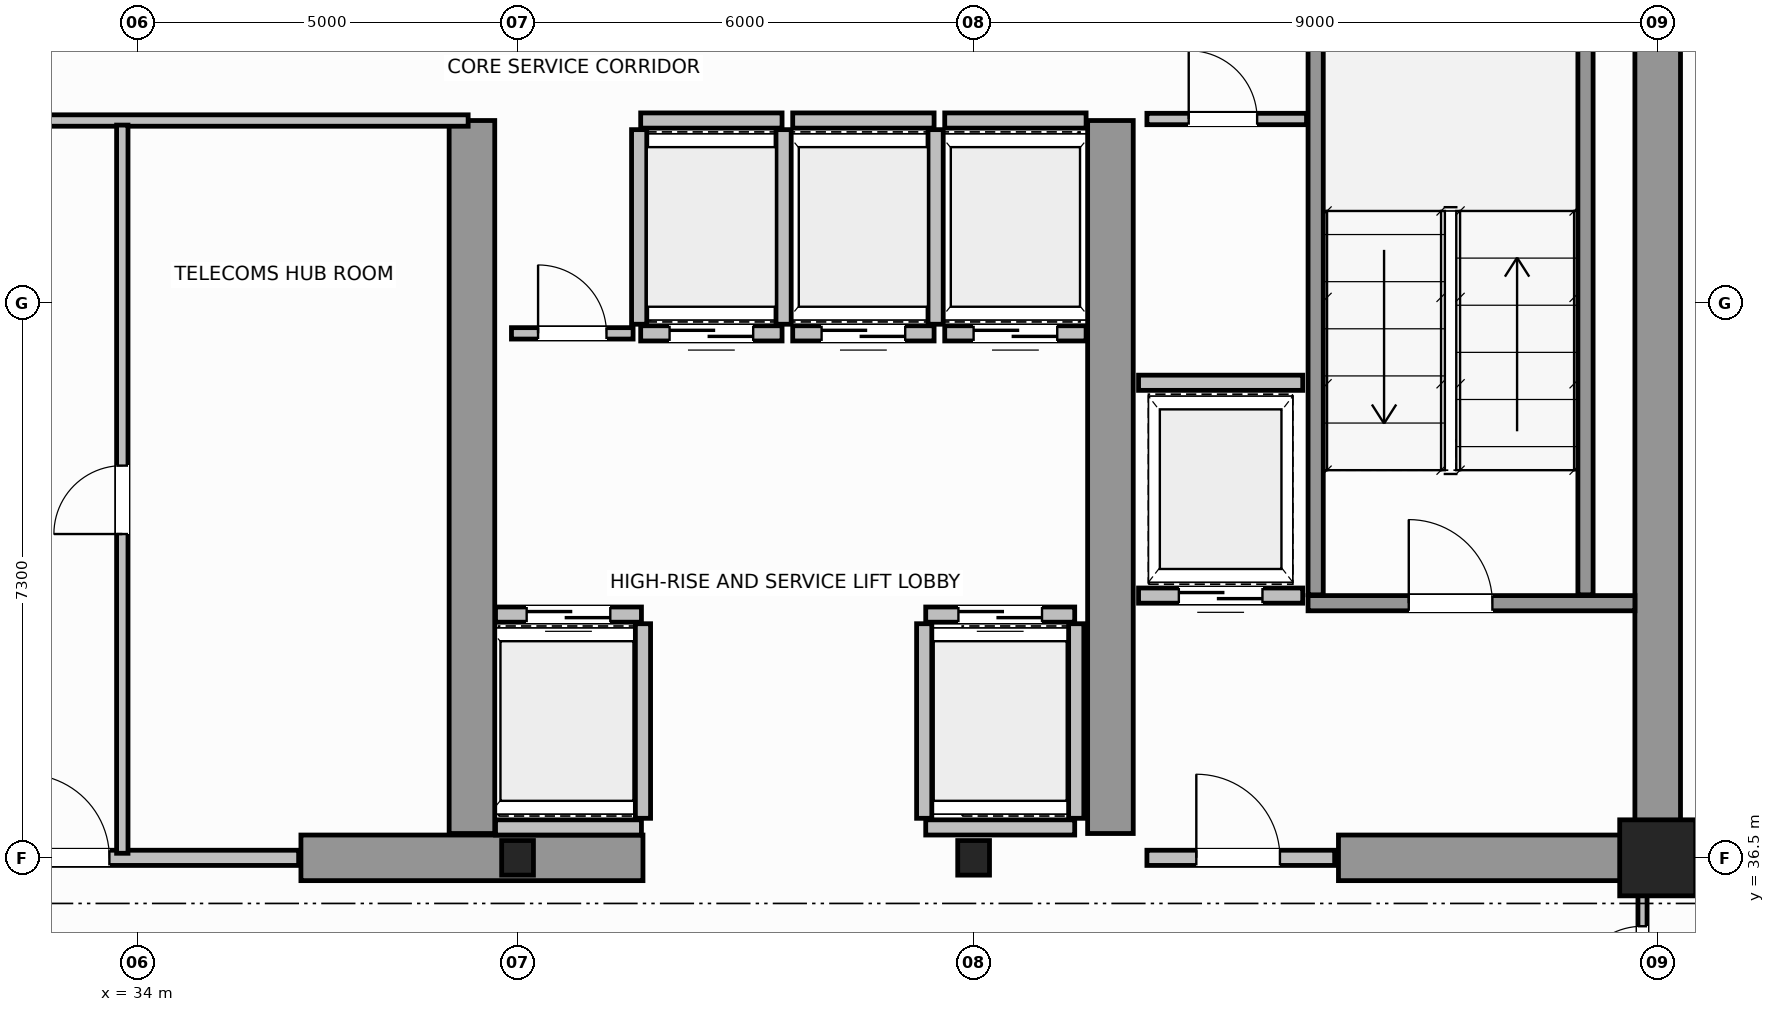
"""IFC4 building model, lengths in metres.
Left out: names, types, materials, properties, quantities, classifications, styles, units other than length and angle.
Written with IfcOpenShell. Run it as: python <this file> out.ifc"""

import sys

from ifc_helpers import new_model, si_unit, direction, frame, frame_2d, origin, origin_2d, place, context, subcontext, project, spatial, rectangle, i_section, extrude, source, transform, mapped, element, fill, save


model = new_model("IFC4")
c1 = context("Model", 3, precision=1e-05, world=origin(), true_north=direction((0.0, 1.0)))
c2 = subcontext(c1, "Body", "Model", "MODEL_VIEW")
j1 = project(units=[si_unit("LENGTHUNIT", "METRE"), si_unit("PLANEANGLEUNIT", "RADIAN")], contexts=[c1])
p1 = place(None, origin())
s1 = spatial("IfcSite", under=j1, at=p1, CompositionType="ELEMENT")
p2 = place(p1, origin())
s2 = spatial("IfcBuilding", under=s1, at=p2, CompositionType="ELEMENT")
p3 = place(p2, frame((0.0, 0.0, 223.2)))
s3 = spatial("IfcBuildingStorey", under=s2, at=p3, CompositionType="ELEMENT", Elevation=223.2)
m1 = source(origin(), c2, "Body", "SweptSolid", [
    extrude(i_section(OverallWidth=0.418, OverallDepth=0.455, WebThickness=0.042, FlangeThickness=0.058, FilletRadius=0.015, at=origin_2d()), origin(), (0.0, 0.0, 1.0), 3.8),
])
for number, where, z_axis, x_axis in (
    (1, (39.0, 36.5, 0.0), (0.0, 0.0, 1.0), (1.0, 0.0, 0.0)),
    (2, (45.0, 36.5, 0.0), (0.0, 0.0, 1.0), (1.0, 0.0, 0.0)),
):
    element("IfcColumn", number, at=place(p3, frame(where, z_axis=z_axis, x_axis=x_axis)), inside=s3, PredefinedType="COLUMN", context=c2, shape_type="MappedRepresentation", body=[
        mapped(m1, transform((0.0, 0.0, 0.0), scale=1.0)),
    ])
m2 = source(origin(), c2, "Body", "SweptSolid", [
    extrude(rectangle(XDim=1.0, YDim=1.0, at=origin_2d()), origin(), (0.0, 0.0, 1.0), 3.8),
])
p4 = place(p3, frame((54.0, 36.5, 0.0), z_axis=(0.0, 0.0, 1.0), x_axis=(1.0, 0.0, 0.0)))
e3 = element("IfcColumn", 3, at=p4, inside=s3, PredefinedType="COLUMN", context=c2, shape_type="MappedRepresentation", body=[
    mapped(m2, transform((0.0, 0.0, 0.0), scale=1.0)),
])
p5 = place(p3, frame((54.0, 36.5, 0.0), z_axis=(0.0, 0.0, 1.0), x_axis=(0.0, 1.0, 0.0)))
e4 = element("IfcWall", 4, at=p5, inside=s3, PredefinedType="SHEAR", context=c2, shape_type="SweptSolid", body=[
    extrude(rectangle(XDim=14.5, YDim=0.6, at=frame_2d((7.25, 0.0))), origin(), (0.0, 0.0, 1.0), 3.8),
])
p6 = place(p3, frame((36.15, 36.5, 0.0), z_axis=(0.0, 0.0, 1.0), x_axis=(1.0, 0.0, 0.0)))
e5 = element("IfcWall", 5, at=p6, inside=s3, PredefinedType="SHEAR", context=c2, shape_type="SweptSolid", body=[
    extrude(rectangle(XDim=4.5, YDim=0.6, at=frame_2d((2.25, 0.0))), origin(), (0.0, 0.0, 1.0), 3.8),
])
p7 = place(p3, frame((49.8, 36.5, 0.0), z_axis=(0.0, 0.0, 1.0), x_axis=(1.0, 0.0, 0.0)))
e6 = element("IfcWall", 6, at=p7, inside=s3, PredefinedType="SHEAR", context=c2, shape_type="SweptSolid", body=[
    extrude(rectangle(XDim=3.88, YDim=0.6, at=frame_2d((1.94, 0.0))), origin(), (0.0, 0.0, 1.0), 2.58),
])
for number, where, z_axis, x_axis in (
    (7, (38.4, 36.82, 0.0), (0.0, 0.0, 1.0), (0.0, 1.0, 0.0)),
    (8, (46.8, 36.82, 0.0), (0.0, 0.0, 1.0), (0.0, 1.0, 0.0)),
):
    element("IfcWall", number, at=place(p3, frame(where, z_axis=z_axis, x_axis=x_axis)), inside=s3, PredefinedType="SHEAR", context=c2, shape_type="SweptSolid", body=[
        extrude(rectangle(XDim=9.38, YDim=0.6, at=frame_2d((4.69, 0.0))), origin(), (0.0, 0.0, 1.0), 3.8),
    ])
p8 = place(p3, frame((49.4, 39.85, 0.0), z_axis=(0.0, 0.0, 1.0), x_axis=(1.0, 0.0, 0.0)))
e9 = element("IfcWall", 9, at=p8, inside=s3, PredefinedType="SOLIDWALL", context=c2, shape_type="SweptSolid", body=[
    extrude(rectangle(XDim=4.3, YDim=0.2, at=frame_2d((2.15, 0.0))), origin(), (0.0, 0.0, 1.0), 3.8),
])
p9 = place(p8, frame((1.325, 0.0, 0.0)))
e10 = element("IfcOpeningElement", 10, at=p9, cuts=e9, PredefinedType="OPENING", context=c2, shape_type="SweptSolid", body=[
    extrude(rectangle(XDim=1.1, YDim=2.15, at=frame_2d((0.55, 1.075))), frame((0.0, 0.11, 0.0), z_axis=(0.0, -1.0, 0.0), x_axis=(1.0, 0.0, 0.0)), (0.0, 0.0, 1.0), 0.22),
])
for number, where, z_axis, x_axis in (
    (11, (49.5, 39.96, 0.0), (0.0, 0.0, 1.0), (0.0, 1.0, 0.0)),
    (12, (53.05, 39.96, 0.0), (0.0, 0.0, 1.0), (0.0, 1.0, 0.0)),
):
    element("IfcWall", number, at=place(p3, frame(where, z_axis=z_axis, x_axis=x_axis)), inside=s3, PredefinedType="SOLIDWALL", context=c2, shape_type="SweptSolid", body=[
        extrude(rectangle(XDim=9.93, YDim=0.2, at=frame_2d((4.965, 0.0))), origin(), (0.0, 0.0, 1.0), 3.8),
    ])
p10 = place(p3, frame((47.28, 36.5, 0.0), z_axis=(0.0, 0.0, 1.0), x_axis=(1.0, 0.0, 0.0)))
e13 = element("IfcWall", 13, at=p10, inside=s3, PredefinedType="SOLIDWALL", context=c2, shape_type="SweptSolid", body=[
    extrude(rectangle(XDim=2.47, YDim=0.2, at=frame_2d((1.235, 0.0))), origin(), (0.0, 0.0, 1.0), 2.57),
])
p11 = place(p10, frame((0.65, 0.0, 0.0)))
e14 = element("IfcOpeningElement", 14, at=p11, cuts=e13, PredefinedType="OPENING", context=c2, shape_type="SweptSolid", body=[
    extrude(rectangle(XDim=1.1, YDim=2.15, at=frame_2d((0.55, 1.075))), frame((0.0, 0.11, 0.0), z_axis=(0.0, -1.0, 0.0), x_axis=(1.0, 0.0, 0.0)), (0.0, 0.0, 1.0), 0.22),
])
p12 = place(p3, frame((38.71, 39.7, 0.0), z_axis=(0.0, 0.0, 1.0), x_axis=(1.0, 0.0, 0.0)))
e15 = element("IfcWall", 15, at=p12, inside=s3, PredefinedType="SOLIDWALL", context=c2, shape_type="SweptSolid", body=[
    extrude(rectangle(XDim=1.92, YDim=0.2, at=frame_2d((0.96, 0.0))), origin(), (0.0, 0.0, 1.0), 3.58),
])
p13 = place(p12, frame((0.41, 0.0, 0.0)))
e16 = element("IfcOpeningElement", 16, at=p13, cuts=e15, PredefinedType="OPENING", context=c2, shape_type="SweptSolid", body=[
    extrude(rectangle(XDim=1.1, YDim=2.15, at=frame_2d((0.55, 1.075))), frame((0.0, 0.11, 0.0), z_axis=(0.0, -1.0, 0.0), x_axis=(1.0, 0.0, 0.0)), (0.0, 0.0, 1.0), 0.22),
])
p14 = place(p3, frame((38.71, 36.9, 0.0), z_axis=(0.0, 0.0, 1.0), x_axis=(1.0, 0.0, 0.0)))
e17 = element("IfcWall", 17, at=p14, inside=s3, PredefinedType="SOLIDWALL", context=c2, shape_type="SweptSolid", body=[
    extrude(rectangle(XDim=1.92, YDim=0.2, at=frame_2d((0.96, 0.0))), origin(), (0.0, 0.0, 1.0), 3.58),
])
p15 = place(p3, frame((40.65, 37.02, 0.0), z_axis=(0.0, 0.0, 1.0), x_axis=(0.0, 1.0, 0.0)))
e18 = element("IfcWall", 18, at=p15, inside=s3, PredefinedType="SOLIDWALL", context=c2, shape_type="SweptSolid", body=[
    extrude(rectangle(XDim=2.56, YDim=0.2, at=frame_2d((1.28, 0.0))), origin(), (0.0, 0.0, 1.0), 3.58),
])
p16 = place(p3, frame((44.37, 39.7, 0.0), z_axis=(0.0, 0.0, 1.0), x_axis=(1.0, 0.0, 0.0)))
e19 = element("IfcWall", 19, at=p16, inside=s3, PredefinedType="SOLIDWALL", context=c2, shape_type="SweptSolid", body=[
    extrude(rectangle(XDim=1.96, YDim=0.2, at=frame_2d((0.98, 0.0))), origin(), (0.0, 0.0, 1.0), 3.58),
])
p17 = place(p16, frame((0.43, 0.0, 0.0)))
e20 = element("IfcOpeningElement", 20, at=p17, cuts=e19, PredefinedType="OPENING", context=c2, shape_type="SweptSolid", body=[
    extrude(rectangle(XDim=1.1, YDim=2.15, at=frame_2d((0.55, 1.075))), frame((0.0, 0.11, 0.0), z_axis=(0.0, -1.0, 0.0), x_axis=(1.0, 0.0, 0.0)), (0.0, 0.0, 1.0), 0.22),
])
p18 = place(p3, frame((44.37, 36.9, 0.0), z_axis=(0.0, 0.0, 1.0), x_axis=(1.0, 0.0, 0.0)))
e21 = element("IfcWall", 21, at=p18, inside=s3, PredefinedType="SOLIDWALL", context=c2, shape_type="SweptSolid", body=[
    extrude(rectangle(XDim=1.96, YDim=0.2, at=frame_2d((0.98, 0.0))), origin(), (0.0, 0.0, 1.0), 2.57),
])
for number, where, z_axis, x_axis in (
    (22, (44.35, 37.02, 0.0), (0.0, 0.0, 1.0), (0.0, 1.0, 0.0)),
    (23, (46.35, 37.02, 0.0), (0.0, 0.0, 1.0), (0.0, 1.0, 0.0)),
):
    element("IfcWall", number, at=place(p3, frame(where, z_axis=z_axis, x_axis=x_axis)), inside=s3, PredefinedType="SOLIDWALL", context=c2, shape_type="SweptSolid", body=[
        extrude(rectangle(XDim=2.56, YDim=0.2, at=frame_2d((1.28, 0.0))), origin(), (0.0, 0.0, 1.0), 3.58),
    ])
p19 = place(p3, frame((40.62, 43.4, 0.0), z_axis=(0.0, 0.0, 1.0), x_axis=(1.0, 0.0, 0.0)))
e24 = element("IfcWall", 24, at=p19, inside=s3, PredefinedType="SOLIDWALL", context=c2, shape_type="SweptSolid", body=[
    extrude(rectangle(XDim=1.86, YDim=0.2, at=frame_2d((0.93, 0.0))), origin(), (0.0, 0.0, 1.0), 3.58),
])
p20 = place(p19, frame((0.38, 0.0, 0.0)))
e25 = element("IfcOpeningElement", 25, at=p20, cuts=e24, PredefinedType="OPENING", context=c2, shape_type="SweptSolid", body=[
    extrude(rectangle(XDim=1.1, YDim=2.15, at=frame_2d((0.55, 1.075))), frame((0.0, 0.11, 0.0), z_axis=(0.0, -1.0, 0.0), x_axis=(1.0, 0.0, 0.0)), (0.0, 0.0, 1.0), 0.22),
])
p21 = place(p3, frame((40.62, 46.2, 0.0), z_axis=(0.0, 0.0, 1.0), x_axis=(1.0, 0.0, 0.0)))
e26 = element("IfcWall", 26, at=p21, inside=s3, PredefinedType="SOLIDWALL", context=c2, shape_type="SweptSolid", body=[
    extrude(rectangle(XDim=1.86, YDim=0.2, at=frame_2d((0.93, 0.0))), origin(), (0.0, 0.0, 1.0), 3.58),
])
for number, where, z_axis, x_axis in (
    (27, (40.6, 43.52, 0.0), (0.0, 0.0, 1.0), (0.0, 1.0, 0.0)),
    (28, (42.5, 43.52, 0.0), (0.0, 0.0, 1.0), (0.0, 1.0, 0.0)),
):
    element("IfcWall", number, at=place(p3, frame(where, z_axis=z_axis, x_axis=x_axis)), inside=s3, PredefinedType="SOLIDWALL", context=c2, shape_type="SweptSolid", body=[
        extrude(rectangle(XDim=2.56, YDim=0.2, at=frame_2d((1.28, 0.0))), origin(), (0.0, 0.0, 1.0), 3.58),
    ])
p22 = place(p3, frame((42.62, 43.4, 0.0), z_axis=(0.0, 0.0, 1.0), x_axis=(1.0, 0.0, 0.0)))
e29 = element("IfcWall", 29, at=p22, inside=s3, PredefinedType="SOLIDWALL", context=c2, shape_type="SweptSolid", body=[
    extrude(rectangle(XDim=1.86, YDim=0.2, at=frame_2d((0.93, 0.0))), origin(), (0.0, 0.0, 1.0), 3.58),
])
p23 = place(p22, frame((0.38, 0.0, 0.0)))
e30 = element("IfcOpeningElement", 30, at=p23, cuts=e29, PredefinedType="OPENING", context=c2, shape_type="SweptSolid", body=[
    extrude(rectangle(XDim=1.1, YDim=2.15, at=frame_2d((0.55, 1.075))), frame((0.0, 0.11, 0.0), z_axis=(0.0, -1.0, 0.0), x_axis=(1.0, 0.0, 0.0)), (0.0, 0.0, 1.0), 0.22),
])
p24 = place(p3, frame((42.62, 46.2, 0.0), z_axis=(0.0, 0.0, 1.0), x_axis=(1.0, 0.0, 0.0)))
e31 = element("IfcWall", 31, at=p24, inside=s3, PredefinedType="SOLIDWALL", context=c2, shape_type="SweptSolid", body=[
    extrude(rectangle(XDim=1.86, YDim=0.2, at=frame_2d((0.93, 0.0))), origin(), (0.0, 0.0, 1.0), 3.58),
])
p25 = place(p3, frame((44.5, 43.52, 0.0), z_axis=(0.0, 0.0, 1.0), x_axis=(0.0, 1.0, 0.0)))
e32 = element("IfcWall", 32, at=p25, inside=s3, PredefinedType="SOLIDWALL", context=c2, shape_type="SweptSolid", body=[
    extrude(rectangle(XDim=2.56, YDim=0.2, at=frame_2d((1.28, 0.0))), origin(), (0.0, 0.0, 1.0), 3.58),
])
p26 = place(p3, frame((44.62, 43.4, 0.0), z_axis=(0.0, 0.0, 1.0), x_axis=(1.0, 0.0, 0.0)))
e33 = element("IfcWall", 33, at=p26, inside=s3, PredefinedType="SOLIDWALL", context=c2, shape_type="SweptSolid", body=[
    extrude(rectangle(XDim=1.86, YDim=0.2, at=frame_2d((0.93, 0.0))), origin(), (0.0, 0.0, 1.0), 3.58),
])
p27 = place(p26, frame((0.38, 0.0, 0.0)))
e34 = element("IfcOpeningElement", 34, at=p27, cuts=e33, PredefinedType="OPENING", context=c2, shape_type="SweptSolid", body=[
    extrude(rectangle(XDim=1.1, YDim=2.15, at=frame_2d((0.55, 1.075))), frame((0.0, 0.11, 0.0), z_axis=(0.0, -1.0, 0.0), x_axis=(1.0, 0.0, 0.0)), (0.0, 0.0, 1.0), 0.22),
])
p28 = place(p3, frame((44.62, 46.2, 0.0), z_axis=(0.0, 0.0, 1.0), x_axis=(1.0, 0.0, 0.0)))
e35 = element("IfcWall", 35, at=p28, inside=s3, PredefinedType="SOLIDWALL", context=c2, shape_type="SweptSolid", body=[
    extrude(rectangle(XDim=1.86, YDim=0.2, at=frame_2d((0.93, 0.0))), origin(), (0.0, 0.0, 1.0), 3.58),
])
p29 = place(p3, frame((47.17, 39.95, 0.0), z_axis=(0.0, 0.0, 1.0), x_axis=(1.0, 0.0, 0.0)))
e36 = element("IfcWall", 36, at=p29, inside=s3, PredefinedType="SOLIDWALL", context=c2, shape_type="SweptSolid", body=[
    extrude(rectangle(XDim=2.16, YDim=0.2, at=frame_2d((1.08, 0.0))), origin(), (0.0, 0.0, 1.0), 3.58),
])
p30 = place(p29, frame((0.53, 0.0, 0.0)))
e37 = element("IfcOpeningElement", 37, at=p30, cuts=e36, PredefinedType="OPENING", context=c2, shape_type="SweptSolid", body=[
    extrude(rectangle(XDim=1.1, YDim=2.15, at=frame_2d((0.55, 1.075))), frame((0.0, 0.11, 0.0), z_axis=(0.0, -1.0, 0.0), x_axis=(1.0, 0.0, 0.0)), (0.0, 0.0, 1.0), 0.22),
])
p31 = place(p3, frame((47.17, 42.75, 0.0), z_axis=(0.0, 0.0, 1.0), x_axis=(1.0, 0.0, 0.0)))
e38 = element("IfcWall", 38, at=p31, inside=s3, PredefinedType="SOLIDWALL", context=c2, shape_type="SweptSolid", body=[
    extrude(rectangle(XDim=2.16, YDim=0.2, at=frame_2d((1.08, 0.0))), origin(), (0.0, 0.0, 1.0), 3.58),
])
p32 = place(p3, frame((32.08, 36.5, 0.0), z_axis=(0.0, 0.0, 1.0), x_axis=(1.0, 0.0, 0.0)))
e39 = element("IfcWall", 39, at=p32, inside=s3, PredefinedType="SOLIDWALL", context=c2, shape_type="SweptSolid", body=[
    extrude(rectangle(XDim=4.04, YDim=0.2, at=frame_2d((2.02, 0.0))), origin(), (0.0, 0.0, 1.0), 2.97),
])
p33 = place(p32, frame((0.45, 0.0, 0.0)))
e40 = element("IfcOpeningElement", 40, at=p33, cuts=e39, PredefinedType="OPENING", context=c2, shape_type="SweptSolid", body=[
    extrude(rectangle(XDim=1.1, YDim=2.15, at=frame_2d((0.55, 1.075))), frame((0.0, 0.11, 0.0), z_axis=(0.0, -1.0, 0.0), x_axis=(1.0, 0.0, 0.0)), (0.0, 0.0, 1.0), 0.22),
])
p34 = place(p3, frame((29.85, 46.2, 0.0), z_axis=(0.0, 0.0, 1.0), x_axis=(1.0, 0.0, 0.0)))
e41 = element("IfcWall", 41, at=p34, inside=s3, PredefinedType="PARTITIONING", context=c2, shape_type="SweptSolid", body=[
    extrude(rectangle(XDim=8.5, YDim=0.15, at=frame_2d((4.25, 0.0))), origin(), (0.0, 0.0, 1.0), 3.58),
])
p35 = place(p3, frame((33.8, 36.56, 0.0), z_axis=(0.0, 0.0, 1.0), x_axis=(0.0, 1.0, 0.0)))
e42 = element("IfcWall", 42, at=p35, inside=s3, PredefinedType="PARTITIONING", context=c2, shape_type="SweptSolid", body=[
    extrude(rectangle(XDim=9.58, YDim=0.15, at=frame_2d((4.79, 0.0))), origin(), (0.0, 0.0, 1.0), 3.58),
])
p36 = place(p35, frame((4.2, 0.0, 0.0)))
e43 = element("IfcOpeningElement", 43, at=p36, cuts=e42, PredefinedType="OPENING", context=c2, shape_type="SweptSolid", body=[
    extrude(rectangle(XDim=0.9, YDim=2.1, at=frame_2d((0.45, 1.05))), frame((0.0, 0.085, 0.0), z_axis=(0.0, -1.0, 0.0), x_axis=(1.0, 0.0, 0.0)), (0.0, 0.0, 1.0), 0.17),
])
p37 = place(p3, frame((47.28, 46.22, 0.0), z_axis=(0.0, 0.0, 1.0), x_axis=(1.0, 0.0, 0.0)))
e44 = element("IfcWall", 44, at=p37, inside=s3, PredefinedType="PARTITIONING", context=c2, shape_type="SweptSolid", body=[
    extrude(rectangle(XDim=2.1, YDim=0.15, at=frame_2d((1.05, 0.0))), origin(), (0.0, 0.0, 1.0), 3.58),
])
p38 = place(p37, frame((0.55, 0.0, 0.0)))
e45 = element("IfcOpeningElement", 45, at=p38, cuts=e44, PredefinedType="OPENING", context=c2, shape_type="SweptSolid", body=[
    extrude(rectangle(XDim=0.9, YDim=2.1, at=frame_2d((0.45, 1.05))), frame((0.0, 0.085, 0.0), z_axis=(0.0, -1.0, 0.0), x_axis=(1.0, 0.0, 0.0)), (0.0, 0.0, 1.0), 0.17),
])
p39 = place(p3, frame((38.92, 43.4, 0.0), z_axis=(0.0, 0.0, 1.0), x_axis=(1.0, 0.0, 0.0)))
e46 = element("IfcWall", 46, at=p39, inside=s3, PredefinedType="PARTITIONING", context=c2, shape_type="SweptSolid", body=[
    extrude(rectangle(XDim=1.6, YDim=0.15, at=frame_2d((0.8, 0.0))), origin(), (0.0, 0.0, 1.0), 3.58),
])
p40 = place(p39, frame((0.35, 0.0, 0.0)))
e47 = element("IfcOpeningElement", 47, at=p40, cuts=e46, PredefinedType="OPENING", context=c2, shape_type="SweptSolid", body=[
    extrude(rectangle(XDim=0.9, YDim=2.1, at=frame_2d((0.45, 1.05))), frame((0.0, 0.085, 0.0), z_axis=(0.0, -1.0, 0.0), x_axis=(1.0, 0.0, 0.0)), (0.0, 0.0, 1.0), 0.17),
])
p41 = place(p3, frame((53.8, 34.0, 0.0), z_axis=(0.0, 0.0, 1.0), x_axis=(0.0, 1.0, 0.0)))
e48 = element("IfcWall", 48, at=p41, inside=s3, PredefinedType="PARTITIONING", context=c2, shape_type="SweptSolid", body=[
    extrude(rectangle(XDim=2.44, YDim=0.12, at=frame_2d((1.22, 0.0))), origin(), (0.0, 0.0, 1.0), 3.58),
])
p42 = place(p41, frame((0.7, 0.0, 0.0)))
e49 = element("IfcOpeningElement", 49, at=p42, cuts=e48, PredefinedType="OPENING", context=c2, shape_type="SweptSolid", body=[
    extrude(rectangle(XDim=0.9, YDim=2.15, at=frame_2d((0.45, 1.075))), frame((0.0, 0.07, 0.0), z_axis=(0.0, -1.0, 0.0), x_axis=(1.0, 0.0, 0.0)), (0.0, 0.0, 1.0), 0.14),
])
m3 = source(origin(), c2, "Body", "SweptSolid", [
    extrude(rectangle(XDim=1.1, YDim=2.15, at=frame_2d((0.55, 1.075))), frame((0.0, 0.025, 0.0), z_axis=(0.0, -1.0, 0.0), x_axis=(1.0, 0.0, 0.0)), (0.0, 0.0, 1.0), 0.05),
])
p43 = place(p9, origin())
e50 = element("IfcDoor", 50, at=p43, inside=s3, OperationType="SINGLE_SWING_RIGHT", PredefinedType="DOOR", context=c2, shape_type="MappedRepresentation", body=[
    mapped(m3, transform((0.0, 0.0, 0.0), scale=1.0)),
])
fill(e10, e50)
p44 = place(p11, origin())
e51 = element("IfcDoor", 51, at=p44, inside=s3, OperationType="SINGLE_SWING_LEFT", PredefinedType="DOOR", context=c2, shape_type="MappedRepresentation", body=[
    mapped(m3, transform((0.0, 0.0, 0.0), scale=1.0)),
])
fill(e14, e51)
p45 = place(p13, origin())
e52 = element("IfcDoor", 52, at=p45, inside=s3, OperationType="DOUBLE_DOOR_SLIDING", PredefinedType="DOOR", context=c2, shape_type="MappedRepresentation", body=[
    mapped(m3, transform((0.0, 0.0, 0.0), scale=1.0)),
])
fill(e16, e52)
p46 = place(p17, origin())
e53 = element("IfcDoor", 53, at=p46, inside=s3, OperationType="DOUBLE_DOOR_SLIDING", PredefinedType="DOOR", context=c2, shape_type="MappedRepresentation", body=[
    mapped(m3, transform((0.0, 0.0, 0.0), scale=1.0)),
])
fill(e20, e53)
p47 = place(p20, origin())
e54 = element("IfcDoor", 54, at=p47, inside=s3, OperationType="DOUBLE_DOOR_SLIDING", PredefinedType="DOOR", context=c2, shape_type="MappedRepresentation", body=[
    mapped(m3, transform((0.0, 0.0, 0.0), scale=1.0)),
])
fill(e25, e54)
p48 = place(p23, origin())
e55 = element("IfcDoor", 55, at=p48, inside=s3, OperationType="DOUBLE_DOOR_SLIDING", PredefinedType="DOOR", context=c2, shape_type="MappedRepresentation", body=[
    mapped(m3, transform((0.0, 0.0, 0.0), scale=1.0)),
])
fill(e30, e55)
p49 = place(p27, origin())
e56 = element("IfcDoor", 56, at=p49, inside=s3, OperationType="DOUBLE_DOOR_SLIDING", PredefinedType="DOOR", context=c2, shape_type="MappedRepresentation", body=[
    mapped(m3, transform((0.0, 0.0, 0.0), scale=1.0)),
])
fill(e34, e56)
p50 = place(p30, origin())
e57 = element("IfcDoor", 57, at=p50, inside=s3, OperationType="DOUBLE_DOOR_SLIDING", PredefinedType="DOOR", context=c2, shape_type="MappedRepresentation", body=[
    mapped(m3, transform((0.0, 0.0, 0.0), scale=1.0)),
])
fill(e37, e57)
p51 = place(p33, origin())
e58 = element("IfcDoor", 58, at=p51, inside=s3, OperationType="SINGLE_SWING_LEFT", PredefinedType="DOOR", context=c2, shape_type="MappedRepresentation", body=[
    mapped(m3, transform((0.0, 0.0, 0.0), scale=1.0)),
])
fill(e40, e58)
m4 = source(origin(), c2, "Body", "SweptSolid", [
    extrude(rectangle(XDim=0.9, YDim=2.1, at=frame_2d((0.45, 1.05))), frame((0.0, 0.025, 0.0), z_axis=(0.0, -1.0, 0.0), x_axis=(1.0, 0.0, 0.0)), (0.0, 0.0, 1.0), 0.05),
])
p52 = place(p36, origin())
e59 = element("IfcDoor", 59, at=p52, inside=s3, OperationType="SINGLE_SWING_RIGHT", PredefinedType="DOOR", context=c2, shape_type="MappedRepresentation", body=[
    mapped(m4, transform((0.0, 0.0, 0.0), scale=1.0)),
])
fill(e43, e59)
p53 = place(p38, origin())
e60 = element("IfcDoor", 60, at=p53, inside=s3, OperationType="SINGLE_SWING_RIGHT", PredefinedType="DOOR", context=c2, shape_type="MappedRepresentation", body=[
    mapped(m4, transform((0.0, 0.0, 0.0), scale=1.0)),
])
fill(e45, e60)
p54 = place(p40, origin())
e61 = element("IfcDoor", 61, at=p54, inside=s3, OperationType="SINGLE_SWING_LEFT", PredefinedType="DOOR", context=c2, shape_type="MappedRepresentation", body=[
    mapped(m4, transform((0.0, 0.0, 0.0), scale=1.0)),
])
fill(e47, e61)
m5 = source(origin(), c2, "Body", "SweptSolid", [
    extrude(rectangle(XDim=0.9, YDim=2.15, at=frame_2d((0.45, 1.075))), frame((0.0, 0.025, 0.0), z_axis=(0.0, -1.0, 0.0), x_axis=(1.0, 0.0, 0.0)), (0.0, 0.0, 1.0), 0.05),
])
p55 = place(p42, origin())
e62 = element("IfcDoor", 62, at=p55, inside=s3, OperationType="SINGLE_SWING_RIGHT", PredefinedType="DOOR", context=c2, shape_type="MappedRepresentation", body=[
    mapped(m5, transform((0.0, 0.0, 0.0), scale=1.0)),
])
fill(e49, e62)
save(model, sys.argv[1])
